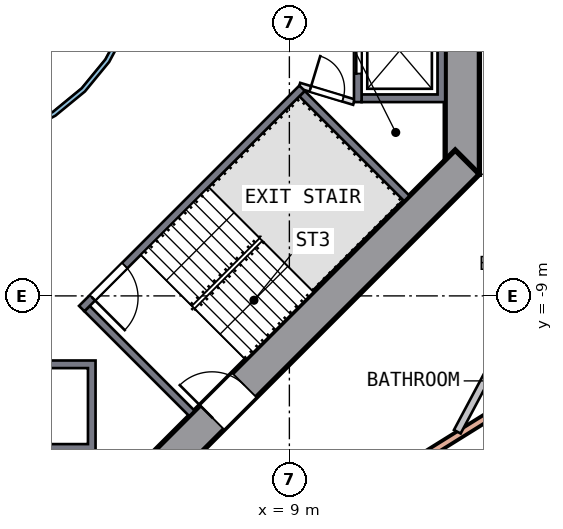
"""IFC4 building model, lengths in metres.
Left out: names, types, materials, properties, quantities, classifications, styles, units other than length and angle.
Written with IfcOpenShell. Run it as: python <this file> out.ifc"""

import sys

from ifc_helpers import new_model, si_unit, direction, frame, frame_2d, origin, place, context, subcontext, project, spatial, polyline, rectangle, outline, extrude, element, fill, save


model = new_model("IFC4")
c1 = context("Model", 3, precision=1e-05, world=origin(), true_north=direction((0.0, 1.0)))
c2 = subcontext(c1, "Body", "Model", "MODEL_VIEW")
j1 = project(units=[si_unit("LENGTHUNIT", "METRE"), si_unit("PLANEANGLEUNIT", "RADIAN")], contexts=[c1])
p1 = place(None, origin())
s1 = spatial("IfcSite", under=j1, at=p1, CompositionType="ELEMENT")
p2 = place(p1, origin())
s2 = spatial("IfcBuilding", under=s1, at=p2, CompositionType="ELEMENT")
p3 = place(p2, frame((0.0, 0.0, 42.5)))
s3 = spatial("IfcBuildingStorey", under=s2, at=p3, CompositionType="ELEMENT", Elevation=42.5)
p4 = place(p3, frame((13.55, -5.799, 0.0), z_axis=(0.0, 0.0, 1.0), x_axis=(0.0, 1.0, 0.0)))
e1 = element("IfcWall", 1, at=p4, inside=s3, PredefinedType="SHEAR", context=c2, shape_type="SweptSolid", body=[
    extrude(rectangle(XDim=11.598, YDim=0.9, at=frame_2d((5.799, 0.0))), origin(), (0.0, 0.0, 1.0), 3.5),
])
p5 = place(p4, frame((4.899, 0.0, 0.0)))
e2 = element("IfcOpeningElement", 2, at=p5, cuts=e1, PredefinedType="OPENING", context=c2, shape_type="SweptSolid", body=[
    extrude(rectangle(XDim=1.8, YDim=2.1, at=frame_2d((0.9, 1.05))), frame((0.0, 0.46, 0.0), z_axis=(0.0, -1.0, 0.0), x_axis=(1.0, 0.0, 0.0)), (0.0, 0.0, 1.0), 0.92),
])
p6 = place(p3, frame((5.481, -13.682, 0.0), z_axis=(0.0, 0.0, 1.0), x_axis=(0.707106781, 0.707106781, 0.0)))
e3 = element("IfcWall", 3, at=p6, inside=s3, PredefinedType="SHEAR", context=c2, shape_type="SweptSolid", body=[
    extrude(rectangle(XDim=11.598, YDim=0.9, at=frame_2d((5.799, 0.0))), origin(), (0.0, 0.0, 1.0), 3.5),
])
p7 = place(p6, frame((2.099, 0.0, 0.0)))
e4 = element("IfcOpeningElement", 4, at=p7, cuts=e3, PredefinedType="OPENING", context=c2, shape_type="SweptSolid", body=[
    extrude(rectangle(XDim=1.2, YDim=2.1, at=frame_2d((0.6, 1.05))), frame((0.0, 0.46, 0.0), z_axis=(0.0, -1.0, 0.0), x_axis=(1.0, 0.0, 0.0)), (0.0, 0.0, 1.0), 0.92),
])
p8 = place(p3, frame((14.959, -11.721, 0.0), z_axis=(0.0, 0.0, 1.0), x_axis=(-0.848786551, -0.528735653, 0.0)))
e5 = element("IfcWall", 5, at=p8, inside=s3, PredefinedType="SOLIDWALL", context=c2, shape_type="SweptSolid", body=[
    extrude(rectangle(XDim=13.0, YDim=0.2, at=frame_2d((6.5, 0.0))), origin(), (0.0, 0.0, 1.0), 3.19),
])
p9 = place(p8, frame((5.6, 0.0, 0.0)))
e6 = element("IfcOpeningElement", 6, at=p9, cuts=e5, PredefinedType="OPENING", context=c2, shape_type="SweptSolid", body=[
    extrude(rectangle(XDim=1.8, YDim=2.4, at=frame_2d((0.9, 1.2))), frame((0.0, 0.11, 0.0), z_axis=(0.0, -1.0, 0.0), x_axis=(1.0, 0.0, 0.0)), (0.0, 0.0, 1.0), 0.22),
])
p10 = place(p3, origin())
e7 = element("IfcWall", 7, at=p10, inside=s3, PredefinedType="SOLIDWALL", context=c2, shape_type="SweptSolid", body=[
    extrude(outline(polyline([(13.1, -3.9), (10.9, -3.9), (10.9, -3.7), (12.9, -3.7), (12.9, -1.4), (10.9, -1.4), (10.9, -1.2), (13.1, -1.2), (13.1, -3.9)])), origin(), (0.0, 0.0, 1.0), 3.19),
])
p11 = place(p3, frame((10.8, -1.2, 0.0), z_axis=(0.0, 0.0, 1.0), x_axis=(0.0, -1.0, 0.0)))
e8 = element("IfcWall", 8, at=p11, inside=s3, PredefinedType="SOLIDWALL", context=c2, shape_type="SweptSolid", body=[
    extrude(rectangle(XDim=2.7, YDim=0.2, at=frame_2d((1.35, 0.0))), origin(), (0.0, 0.0, 1.0), 3.19),
])
p12 = place(p11, frame((0.75, 0.0, 0.0)))
e9 = element("IfcOpeningElement", 9, at=p12, cuts=e8, PredefinedType="OPENING", context=c2, shape_type="SweptSolid", body=[
    extrude(rectangle(XDim=1.2, YDim=2.1, at=frame_2d((0.6, 1.05))), frame((0.0, 0.11, 0.0), z_axis=(0.0, -1.0, 0.0), x_axis=(1.0, 0.0, 0.0)), (0.0, 0.0, 1.0), 0.22),
])
p13 = place(p3, origin())
e10 = element("IfcWall", 10, at=p13, inside=s3, PredefinedType="SOLIDWALL", context=c2, shape_type="SweptSolid", body=[
    extrude(outline(polyline([(3.9, -10.7), (3.9, -13.1), (1.2, -13.1), (1.2, -10.7), (3.9, -10.7)]), holes=[polyline([(1.4, -12.9), (3.7, -12.9), (3.7, -10.9), (1.4, -10.9), (1.4, -12.9)])]), origin(), (0.0, 0.0, 1.0), 3.19),
])
p14 = place(p3, frame((9.334, -3.535, 0.0), z_axis=(0.0, 0.0, 1.0), x_axis=(-0.707106781, -0.707106781, 0.0)))
e11 = element("IfcWall", 11, at=p14, inside=s3, PredefinedType="SOLIDWALL", context=c2, shape_type="SweptSolid", body=[
    extrude(rectangle(XDim=8.2, YDim=0.2, at=frame_2d((4.1, 0.0))), origin(), (0.0, 0.0, 1.0), 3.19),
])
p15 = place(p14, frame((6.6, 0.0, 0.0)))
e12 = element("IfcOpeningElement", 12, at=p15, cuts=e11, PredefinedType="OPENING", context=c2, shape_type="SweptSolid", body=[
    extrude(rectangle(XDim=1.2, YDim=2.1, at=frame_2d((0.6, 1.05))), frame((0.0, 0.11, 0.0), z_axis=(0.0, -1.0, 0.0), x_axis=(1.0, 0.0, 0.0)), (0.0, 0.0, 1.0), 0.22),
])
for number, where, z_axis, x_axis in (
    (13, (3.677, -9.334, 0.0), (0.0, 0.0, 1.0), (0.707, -0.707, 0.0)),
    (14, (9.334, -3.677, 0.0), (0.0, 0.0, 1.0), (0.707, -0.707, 0.0)),
):
    element("IfcWall", number, at=place(p3, frame(where, z_axis=z_axis, x_axis=x_axis)), inside=s3, PredefinedType="SOLIDWALL", context=c2, shape_type="SweptSolid", body=[
        extrude(rectangle(XDim=3.9, YDim=0.2, at=frame_2d((1.95, 0.0))), origin(), (0.0, 0.0, 1.0), 3.19),
    ])
p16 = place(p3, frame((9.263, -3.465, 0.0), z_axis=(0.0, 0.0, 1.0), x_axis=(0.957084567, -0.289808785, 0.0)))
e15 = element("IfcWall", 15, at=p16, inside=s3, PredefinedType="PARTITIONING", context=c2, shape_type="SweptSolid", body=[
    extrude(rectangle(XDim=1.501, YDim=0.15, at=frame_2d((0.75, 0.0))), origin(), (0.0, 0.0, 1.0), 3.19),
])
p17 = place(p16, frame((0.301, 0.0, 0.0)))
e16 = element("IfcOpeningElement", 16, at=p17, cuts=e15, PredefinedType="OPENING", context=c2, shape_type="SweptSolid", body=[
    extrude(rectangle(XDim=0.9, YDim=2.1, at=frame_2d((0.45, 1.05))), frame((0.0, 0.085, 0.0), z_axis=(0.0, -1.0, 0.0), x_axis=(1.0, 0.0, 0.0)), (0.0, 0.0, 1.0), 0.17),
])
p18 = place(p3, origin())
e17 = element("IfcWall", 17, at=p18, inside=s3, PredefinedType="SOLIDWALL", context=c2, shape_type="SweptSolid", body=[
    extrude(outline(polyline([(5.021, -0.999), (4.73, -1.959), (4.257, -2.844), (3.62, -3.62), (2.844, -4.257), (1.959, -4.73), (0.999, -5.021), (0.0, -5.12), (-0.999, -5.021), (-1.959, -4.73), (-2.844, -4.257), (-3.62, -3.62), (-4.257, -2.844), (-4.73, -1.959), (-5.021, -0.999), (-5.12, 0.0), (-5.021, 0.999), (-4.73, 1.959), (-4.257, 2.844), (-3.62, 3.62), (-2.844, 4.257), (-1.959, 4.73), (-0.999, 5.021), (0.0, 5.12), (0.999, 5.021), (1.959, 4.73), (2.844, 4.257), (3.62, 3.62), (4.257, 2.844), (4.73, 1.959), (5.021, 0.999), (5.12, 0.0), (5.021, -0.999)]), holes=[polyline([(4.904, 0.976), (4.619, 1.913), (4.157, 2.778), (3.535, 3.535), (2.778, 4.157), (1.913, 4.619), (0.976, 4.904), (0.0, 5.0), (-0.976, 4.904), (-1.913, 4.619), (-2.778, 4.157), (-3.535, 3.535), (-4.157, 2.778), (-4.619, 1.913), (-4.904, 0.976), (-5.0, 0.0), (-4.904, -0.976), (-4.619, -1.913), (-4.157, -2.778), (-3.535, -3.535), (-2.778, -4.157), (-1.913, -4.619), (-0.976, -4.904), (0.0, -5.0), (0.976, -4.904), (1.913, -4.619), (2.778, -4.157), (3.535, -3.535), (4.157, -2.778), (4.619, -1.913), (4.904, -0.976), (5.0, 0.0), (4.904, 0.976)])]), origin(), (0.0, 0.0, 1.0), 3.19),
])
p19 = place(p3, frame((13.419, -12.575, 0.0), z_axis=(0.0, 0.0, 1.0), x_axis=(0.470712248, 0.88228679, 0.0)))
e18 = element("IfcWall", 18, at=p19, inside=s3, PredefinedType="SOLIDWALL", context=c2, shape_type="SweptSolid", body=[
    extrude(rectangle(XDim=3.678, YDim=0.2, at=frame_2d((1.839, 0.0))), origin(), (0.0, 0.0, 1.0), 3.19),
])
p20 = place(p12, origin())
e19 = element("IfcDoor", 19, at=p20, inside=s3, OperationType="DOUBLE_DOOR_SLIDING", PredefinedType="DOOR", context=c2, shape_type="SweptSolid", body=[
    extrude(rectangle(XDim=1.2, YDim=2.1, at=frame_2d((0.6, 1.05))), frame((0.0, 0.025, 0.0), z_axis=(0.0, -1.0, 0.0), x_axis=(1.0, 0.0, 0.0)), (0.0, 0.0, 1.0), 0.05),
])
fill(e9, e19)
p21 = place(p15, origin())
e20 = element("IfcDoor", 20, at=p21, inside=s3, OperationType="SINGLE_SWING_RIGHT", PredefinedType="DOOR", context=c2, shape_type="SweptSolid", body=[
    extrude(rectangle(XDim=1.2, YDim=2.1, at=frame_2d((0.6, 1.05))), frame((0.0, 0.025, 0.0), z_axis=(0.0, -1.0, 0.0), x_axis=(1.0, 0.0, 0.0)), (0.0, 0.0, 1.0), 0.05),
])
fill(e12, e20)
p22 = place(p7, origin())
e21 = element("IfcDoor", 21, at=p22, inside=s3, OperationType="SINGLE_SWING_LEFT", PredefinedType="DOOR", context=c2, shape_type="SweptSolid", body=[
    extrude(rectangle(XDim=1.2, YDim=2.1, at=frame_2d((0.6, 1.05))), frame((0.0, 0.025, 0.0), z_axis=(0.0, -1.0, 0.0), x_axis=(1.0, 0.0, 0.0)), (0.0, 0.0, 1.0), 0.05),
])
fill(e4, e21)
p23 = place(p17, origin())
e22 = element("IfcDoor", 22, at=p23, inside=s3, OperationType="SINGLE_SWING_LEFT", PredefinedType="DOOR", context=c2, shape_type="SweptSolid", body=[
    extrude(rectangle(XDim=0.9, YDim=2.1, at=frame_2d((0.45, 1.05))), frame((0.0, 0.025, 0.0), z_axis=(0.0, -1.0, 0.0), x_axis=(1.0, 0.0, 0.0)), (0.0, 0.0, 1.0), 0.05),
])
fill(e16, e22)
save(model, sys.argv[1])
